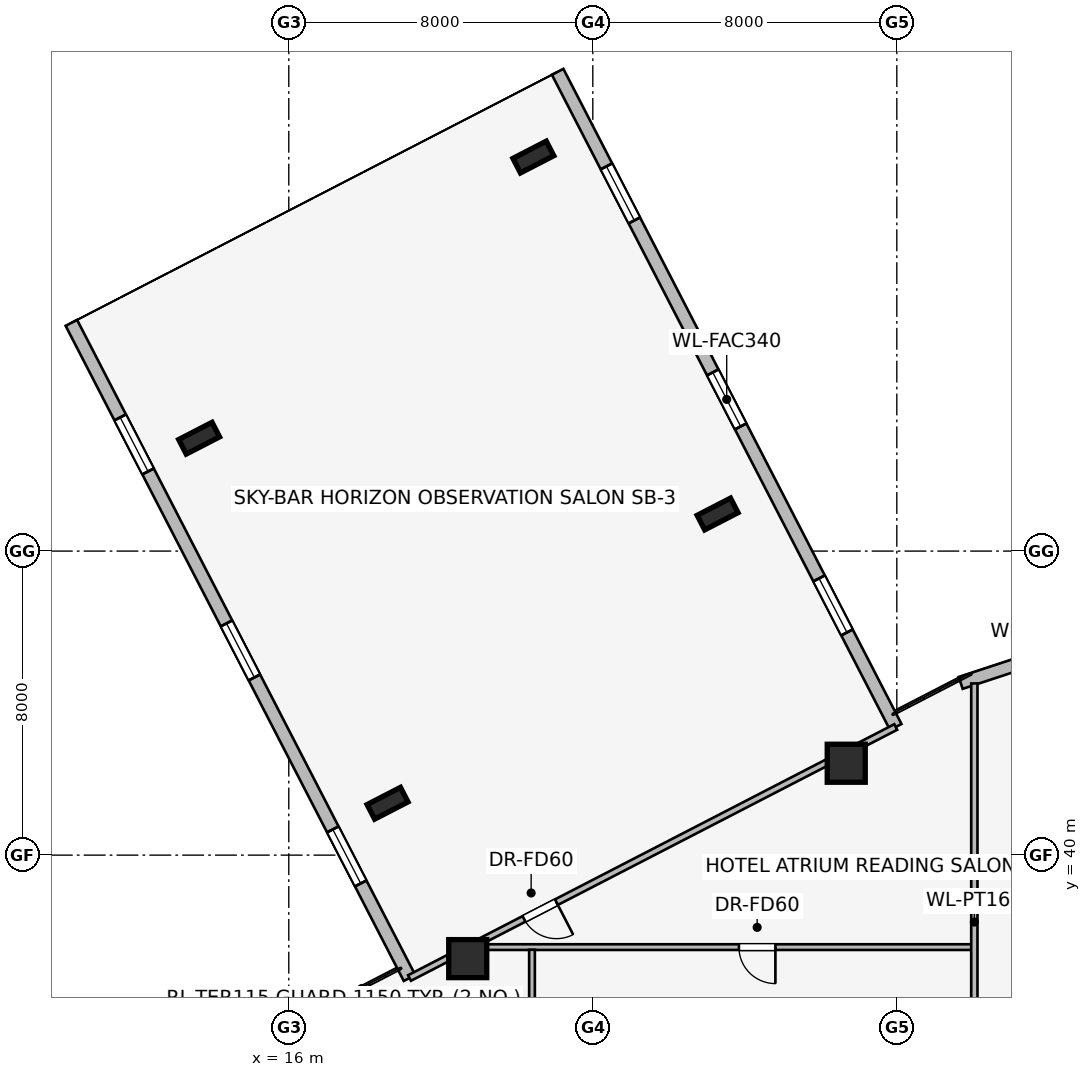
"""IFC4 building model, lengths in metres.
Left out: names, types, materials, properties, quantities, classifications, styles, units other than length and angle.
Written with IfcOpenShell. Run it as: python <this file> out.ifc"""

import sys

from ifc_helpers import new_model, si_unit, direction, frame, frame_2d, origin, origin_2d, place, context, subcontext, project, spatial, rectangle, i_section, extrude, element, fill, save


model = new_model("IFC4")
c1 = context("Model", 3, precision=1e-05, world=origin(), true_north=direction((0.0, 1.0)))
c2 = subcontext(c1, "Body", "Model", "MODEL_VIEW")
j1 = project(units=[si_unit("LENGTHUNIT", "METRE"), si_unit("PLANEANGLEUNIT", "RADIAN")], contexts=[c1])
p1 = place(None, origin())
s1 = spatial("IfcSite", under=j1, at=p1, CompositionType="ELEMENT")
p2 = place(p1, origin())
s2 = spatial("IfcBuilding", under=s1, at=p2, CompositionType="ELEMENT")
p3 = place(p2, frame((0.0, 0.0, 146.4)))
s3 = spatial("IfcBuildingStorey", under=s2, at=p3, CompositionType="ELEMENT", Elevation=146.4)
for number, where, z_axis, x_axis in (
    (1, (30.669, 42.418, 0.0), (0.0, 0.0, 1.0), (1.0, 0.0, 0.0)),
    (2, (20.709, 37.277, 0.0), (0.0, 0.0, 1.0), (1.0, 0.0, 0.0)),
):
    element("IfcColumn", number, at=place(p3, frame(where, z_axis=z_axis, x_axis=x_axis)), inside=s3, PredefinedType="COLUMN", context=c2, shape_type="SweptSolid", body=[
        extrude(rectangle(XDim=1.0, YDim=1.0, at=origin_2d()), origin(), (0.0, 0.0, 1.0), 3.45),
    ])
for number, where, z_axis, x_axis in (
    (3, (27.284, 48.976, 0.0), (0.0, 0.0, 1.0), (-0.459, 0.889, 0.0)),
    (4, (18.599, 41.365, 0.0), (0.0, 0.0, 1.0), (-0.459, 0.889, 0.0)),
    (5, (22.436, 58.368, 0.0), (0.0, 0.0, 1.0), (-0.459, 0.889, 0.0)),
    (6, (13.641, 50.97, 0.0), (0.0, 0.0, 1.0), (-0.459, 0.889, 0.0)),
):
    element("IfcColumn", number, at=place(p3, frame(where, z_axis=z_axis, x_axis=x_axis)), inside=s3, PredefinedType="COLUMN", context=c2, shape_type="SweptSolid", body=[
        extrude(i_section(OverallWidth=0.431, OverallDepth=0.987, WebThickness=0.034, FlangeThickness=0.062, at=origin_2d()), origin(), (0.0, 0.0, 1.0), 3.45),
    ])
p4 = place(p3, frame((33.681, 44.532, 0.0), z_axis=(0.0, 0.0, 1.0), x_axis=(0.949937416267, 0.312440242569, 0.0)))
e7 = element("IfcWall", 7, at=p4, inside=s3, PredefinedType="STANDARD", context=c2, shape_type="SweptSolid", body=[
    extrude(rectangle(XDim=1.722, YDim=0.33, at=frame_2d((0.861, 0.0))), origin(), (0.0, 0.0, 1.0), 3.19),
])
p5 = place(p3, frame((23.075, 60.611, 0.0), z_axis=(0.0, 0.0, 1.0), x_axis=(0.458619197522, -0.888632900395, 0.0)))
e8 = element("IfcWall", 8, at=p5, inside=s3, PredefinedType="STANDARD", context=c2, shape_type="SweptSolid", body=[
    extrude(rectangle(XDim=19.399, YDim=0.34, at=frame_2d((9.7, 0.0))), origin(), (0.0, 0.0, 1.0), 3.19),
])
p6 = place(p5, frame((2.8, 0.0, 0.75)))
e9 = element("IfcOpeningElement", 9, at=p6, cuts=e8, PredefinedType="OPENING", context=c2, shape_type="SweptSolid", body=[
    extrude(rectangle(XDim=1.6, YDim=1.55, at=frame_2d((0.8, 0.775))), frame((0.0, 0.18, 0.0), z_axis=(0.0, -1.0, 0.0), x_axis=(1.0, 0.0, 0.0)), (0.0, 0.0, 1.0), 0.36),
])
p7 = place(p5, frame((8.9, 0.0, 0.75)))
e10 = element("IfcOpeningElement", 10, at=p7, cuts=e8, PredefinedType="OPENING", context=c2, shape_type="SweptSolid", body=[
    extrude(rectangle(XDim=1.6, YDim=1.55, at=frame_2d((0.8, 0.775))), frame((0.0, 0.18, 0.0), z_axis=(0.0, -1.0, 0.0), x_axis=(1.0, 0.0, 0.0)), (0.0, 0.0, 1.0), 0.36),
])
p8 = place(p5, frame((15.0, 0.0, 0.75)))
e11 = element("IfcOpeningElement", 11, at=p8, cuts=e8, PredefinedType="OPENING", context=c2, shape_type="SweptSolid", body=[
    extrude(rectangle(XDim=1.6, YDim=1.55, at=frame_2d((0.8, 0.775))), frame((0.0, 0.18, 0.0), z_axis=(0.0, -1.0, 0.0), x_axis=(1.0, 0.0, 0.0)), (0.0, 0.0, 1.0), 0.36),
])
p9 = place(p3, frame((19.177, 36.767, 0.0), z_axis=(0.0, 0.0, 1.0), x_axis=(-0.458658947762, 0.88861238436, 0.0)))
e12 = element("IfcWall", 12, at=p9, inside=s3, PredefinedType="STANDARD", context=c2, shape_type="SweptSolid", body=[
    extrude(rectangle(XDim=19.4, YDim=0.34, at=frame_2d((9.7, 0.0))), origin(), (0.0, 0.0, 1.0), 3.19),
])
p10 = place(p9, frame((2.8, 0.0, 0.75)))
e13 = element("IfcOpeningElement", 13, at=p10, cuts=e12, PredefinedType="OPENING", context=c2, shape_type="SweptSolid", body=[
    extrude(rectangle(XDim=1.6, YDim=1.55, at=frame_2d((0.8, 0.775))), frame((0.0, 0.18, 0.0), z_axis=(0.0, -1.0, 0.0), x_axis=(1.0, 0.0, 0.0)), (0.0, 0.0, 1.0), 0.36),
])
p11 = place(p9, frame((8.9, 0.0, 0.75)))
e14 = element("IfcOpeningElement", 14, at=p11, cuts=e12, PredefinedType="OPENING", context=c2, shape_type="SweptSolid", body=[
    extrude(rectangle(XDim=1.6, YDim=1.55, at=frame_2d((0.8, 0.775))), frame((0.0, 0.18, 0.0), z_axis=(0.0, -1.0, 0.0), x_axis=(1.0, 0.0, 0.0)), (0.0, 0.0, 1.0), 0.36),
])
p12 = place(p9, frame((15.0, 0.0, 0.75)))
e15 = element("IfcOpeningElement", 15, at=p12, cuts=e12, PredefinedType="OPENING", context=c2, shape_type="SweptSolid", body=[
    extrude(rectangle(XDim=1.6, YDim=1.55, at=frame_2d((0.8, 0.775))), frame((0.0, 0.18, 0.0), z_axis=(0.0, -1.0, 0.0), x_axis=(1.0, 0.0, 0.0)), (0.0, 0.0, 1.0), 0.36),
])
p13 = place(p3, frame((34.0, 37.58, 0.0), z_axis=(0.0, 0.0, 1.0), x_axis=(-1.0, 0.0, 0.0)))
e16 = element("IfcWall", 16, at=p13, inside=s3, PredefinedType="PARTITIONING", context=c2, shape_type="SweptSolid", body=[
    extrude(rectangle(XDim=13.707, YDim=0.15, at=frame_2d((6.854, 0.0))), origin(), (0.0, 0.0, 1.0), 2.657),
])
p14 = place(p13, frame((5.195, 0.0, 0.0)))
e17 = element("IfcOpeningElement", 17, at=p14, cuts=e16, PredefinedType="OPENING", context=c2, shape_type="SweptSolid", body=[
    extrude(rectangle(XDim=0.96, YDim=2.0, at=frame_2d((0.48, 1.0))), frame((0.0, 0.085, 0.0), z_axis=(0.0, -1.0, 0.0), x_axis=(1.0, 0.0, 0.0)), (0.0, 0.0, 1.0), 0.17),
])
p15 = place(p3, frame((34.04, 31.96, 0.0), z_axis=(0.0, 0.0, 1.0), x_axis=(0.0, 1.0, 0.0)))
e18 = element("IfcWall", 18, at=p15, inside=s3, PredefinedType="PARTITIONING", context=c2, shape_type="SweptSolid", body=[
    extrude(rectangle(XDim=12.558, YDim=0.165, at=frame_2d((6.279, 0.0))), origin(), (0.0, 0.0, 1.0), 3.19),
])
p16 = place(p3, frame((31.972, 43.372, 0.0), z_axis=(0.0, 0.0, 1.0), x_axis=(-0.888588109751, -0.458705974683, 0.0)))
e19 = element("IfcWall", 19, at=p16, inside=s3, PredefinedType="PARTITIONING", context=c2, shape_type="SweptSolid", body=[
    extrude(rectangle(XDim=14.399, YDim=0.165, at=frame_2d((7.2, 0.0))), origin(), (0.0, 0.0, 1.0), 2.562),
])
p17 = place(p16, frame((10.049, 0.0, 0.0)))
e20 = element("IfcOpeningElement", 20, at=p17, cuts=e19, PredefinedType="OPENING", context=c2, shape_type="SweptSolid", body=[
    extrude(rectangle(XDim=0.96, YDim=2.0, at=frame_2d((0.48, 1.0))), frame((0.0, 0.093, 0.0), z_axis=(0.0, -1.0, 0.0), x_axis=(1.0, 0.0, 0.0)), (0.0, 0.0, 1.0), 0.185),
])
p18 = place(p3, frame((22.4, 36.08, 0.0), z_axis=(0.0, 0.0, 1.0), x_axis=(0.0, 1.0, 0.0)))
e21 = element("IfcWall", 21, at=p18, inside=s3, PredefinedType="PARTITIONING", context=c2, shape_type="SweptSolid", body=[
    extrude(rectangle(XDim=1.43, YDim=0.15, at=frame_2d((0.715, 0.0))), origin(), (0.0, 0.0, 1.0), 3.19),
])
p19 = place(p6, origin())
e22 = element("IfcWindow", 22, at=p19, inside=s3, PartitioningType="SINGLE_PANEL", PredefinedType="WINDOW", context=c2, shape_type="SweptSolid", body=[
    extrude(rectangle(XDim=1.6, YDim=1.55, at=frame_2d((0.8, 0.775))), frame((0.0, 0.03, 0.0), z_axis=(0.0, -1.0, 0.0), x_axis=(1.0, 0.0, 0.0)), (0.0, 0.0, 1.0), 0.06),
])
fill(e9, e22)
p20 = place(p7, origin())
e23 = element("IfcWindow", 23, at=p20, inside=s3, PartitioningType="SINGLE_PANEL", PredefinedType="WINDOW", context=c2, shape_type="SweptSolid", body=[
    extrude(rectangle(XDim=1.6, YDim=1.55, at=frame_2d((0.8, 0.775))), frame((0.0, 0.03, 0.0), z_axis=(0.0, -1.0, 0.0), x_axis=(1.0, 0.0, 0.0)), (0.0, 0.0, 1.0), 0.06),
])
fill(e10, e23)
p21 = place(p8, origin())
e24 = element("IfcWindow", 24, at=p21, inside=s3, PartitioningType="SINGLE_PANEL", PredefinedType="WINDOW", context=c2, shape_type="SweptSolid", body=[
    extrude(rectangle(XDim=1.6, YDim=1.55, at=frame_2d((0.8, 0.775))), frame((0.0, 0.03, 0.0), z_axis=(0.0, -1.0, 0.0), x_axis=(1.0, 0.0, 0.0)), (0.0, 0.0, 1.0), 0.06),
])
fill(e11, e24)
p22 = place(p10, origin())
e25 = element("IfcWindow", 25, at=p22, inside=s3, PartitioningType="SINGLE_PANEL", PredefinedType="WINDOW", context=c2, shape_type="SweptSolid", body=[
    extrude(rectangle(XDim=1.6, YDim=1.55, at=frame_2d((0.8, 0.775))), frame((0.0, 0.03, 0.0), z_axis=(0.0, -1.0, 0.0), x_axis=(1.0, 0.0, 0.0)), (0.0, 0.0, 1.0), 0.06),
])
fill(e13, e25)
p23 = place(p11, origin())
e26 = element("IfcWindow", 26, at=p23, inside=s3, PartitioningType="SINGLE_PANEL", PredefinedType="WINDOW", context=c2, shape_type="SweptSolid", body=[
    extrude(rectangle(XDim=1.6, YDim=1.55, at=frame_2d((0.8, 0.775))), frame((0.0, 0.03, 0.0), z_axis=(0.0, -1.0, 0.0), x_axis=(1.0, 0.0, 0.0)), (0.0, 0.0, 1.0), 0.06),
])
fill(e14, e26)
p24 = place(p12, origin())
e27 = element("IfcWindow", 27, at=p24, inside=s3, PartitioningType="SINGLE_PANEL", PredefinedType="WINDOW", context=c2, shape_type="SweptSolid", body=[
    extrude(rectangle(XDim=1.6, YDim=1.55, at=frame_2d((0.8, 0.775))), frame((0.0, 0.03, 0.0), z_axis=(0.0, -1.0, 0.0), x_axis=(1.0, 0.0, 0.0)), (0.0, 0.0, 1.0), 0.06),
])
fill(e15, e27)
p25 = place(p14, origin())
e28 = element("IfcDoor", 28, at=p25, inside=s3, OperationType="SINGLE_SWING_LEFT", PredefinedType="DOOR", context=c2, shape_type="SweptSolid", body=[
    extrude(rectangle(XDim=0.96, YDim=2.0, at=frame_2d((0.48, 1.0))), frame((0.0, 0.025, 0.0), z_axis=(0.0, -1.0, 0.0), x_axis=(1.0, 0.0, 0.0)), (0.0, 0.0, 1.0), 0.05),
])
fill(e17, e28)
p26 = place(p17, origin())
e29 = element("IfcDoor", 29, at=p26, inside=s3, OperationType="SINGLE_SWING_LEFT", PredefinedType="DOOR", context=c2, shape_type="SweptSolid", body=[
    extrude(rectangle(XDim=0.96, YDim=2.0, at=frame_2d((0.48, 1.0))), frame((0.0, 0.025, 0.0), z_axis=(0.0, -1.0, 0.0), x_axis=(1.0, 0.0, 0.0)), (0.0, 0.0, 1.0), 0.05),
])
fill(e20, e29)
save(model, sys.argv[1])
